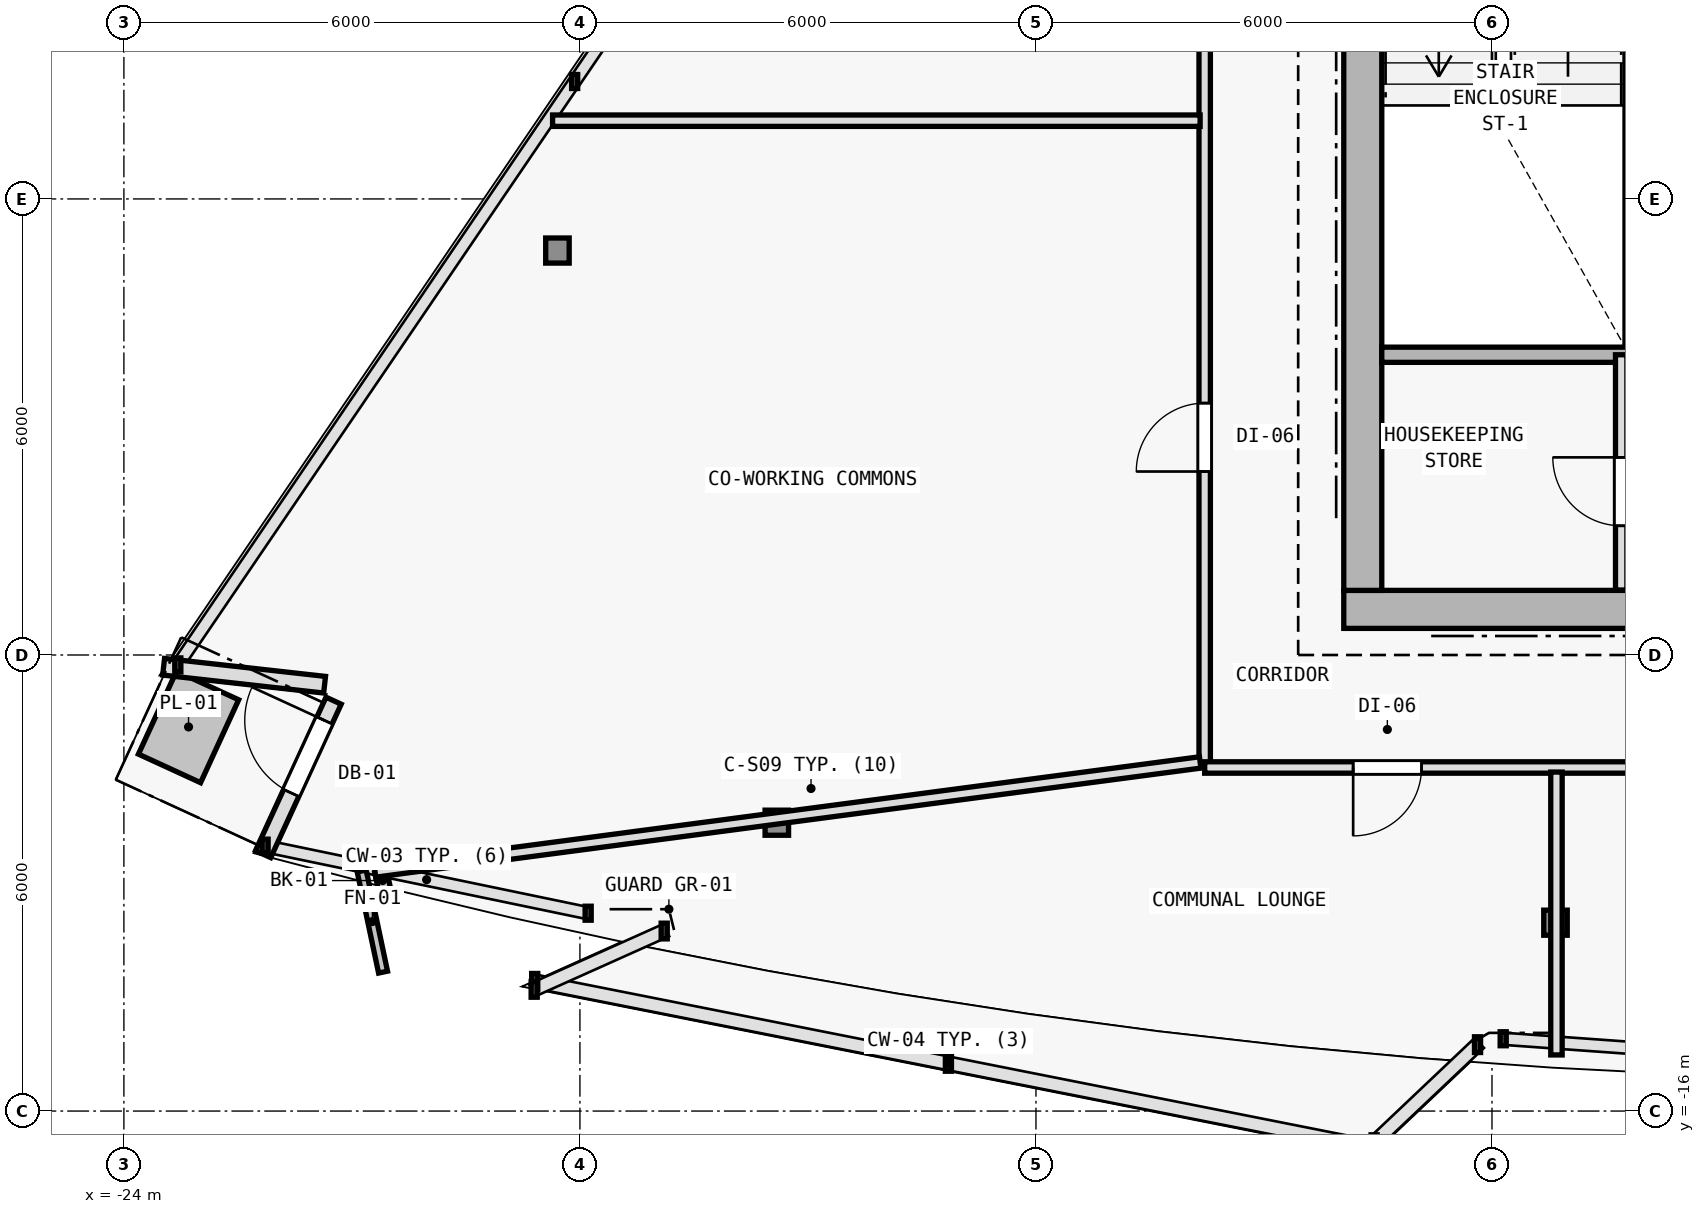
"""IFC4 building model, lengths in metres.
Left out: names, types, materials, properties, quantities, classifications, styles, units other than length and angle.
Written with IfcOpenShell. Run it as: python <this file> out.ifc"""

import sys

from ifc_helpers import new_model, si_unit, direction, frame, frame_2d, origin, origin_2d, place, context, subcontext, project, spatial, rectangle, i_section, extrude, element, fill, save


model = new_model("IFC4")
c1 = context("Model", 3, precision=1e-05, world=origin(), true_north=direction((0.0, 1.0)))
c2 = subcontext(c1, "Body", "Model", "MODEL_VIEW")
j1 = project(units=[si_unit("LENGTHUNIT", "METRE"), si_unit("PLANEANGLEUNIT", "RADIAN")], contexts=[c1])
p1 = place(None, origin())
s1 = spatial("IfcSite", under=j1, at=p1, CompositionType="ELEMENT")
p2 = place(p1, origin())
s2 = spatial("IfcBuilding", under=s1, at=p2, CompositionType="ELEMENT")
p3 = place(p2, frame((0.0, 0.0, 276.0)))
s3 = spatial("IfcBuildingStorey", under=s2, at=p3, CompositionType="ELEMENT", Elevation=276.0)
p4 = place(p3, frame((-7.7, -9.4, 0.0), z_axis=(0.0, 0.0, 1.0), x_axis=(1.0, 0.0, 0.0)))
e1 = element("IfcColumn", 1, at=p4, inside=s3, PredefinedType="COLUMN", context=c2, shape_type="SweptSolid", body=[
    extrude(i_section(OverallWidth=0.374, OverallDepth=0.372, WebThickness=0.012, FlangeThickness=0.02, FilletRadius=0.015, at=origin_2d()), origin(), (0.0, 0.0, 1.0), 3.6),
])
p5 = place(p3, frame((-15.409, -12.207, 0.006), z_axis=(0.021207106828, 0.034461548595, 0.999180994759), x_axis=(-0.851658316705, 0.524097425664, 0.0)))
e2 = element("IfcColumn", 2, at=p5, inside=s3, PredefinedType="COLUMN", context=c2, shape_type="SweptSolid", body=[
    extrude(i_section(OverallWidth=0.309, OverallDepth=0.33, WebThickness=0.011, FlangeThickness=0.019, FilletRadius=0.027, at=origin_2d()), origin(), (0.0, 0.0, 1.0), 3.592),
])
p6 = place(p3, frame((-5.165, -13.522, 0.006), z_axis=(0.007137984635, 0.036233769623, 0.999317848892), x_axis=(-0.981142984211, 0.193283327096, 0.0)))
e3 = element("IfcColumn", 3, at=p6, inside=s3, PredefinedType="COLUMN", context=c2, shape_type="SweptSolid", body=[
    extrude(i_section(OverallWidth=0.309, OverallDepth=0.33, WebThickness=0.011, FlangeThickness=0.019, FilletRadius=0.027, at=origin_2d()), origin(), (0.0, 0.0, 1.0), 3.591),
])
p7 = place(p3, frame((-18.296, -4.679, 0.006), z_axis=(0.025903262414, 0.022231933883, 0.999417211235), x_axis=(-0.65128330188, 0.758834672832, 0.0)))
e4 = element("IfcColumn", 4, at=p7, inside=s3, PredefinedType="COLUMN", context=c2, shape_type="SweptSolid", body=[
    extrude(i_section(OverallWidth=0.309, OverallDepth=0.33, WebThickness=0.011, FlangeThickness=0.019, FilletRadius=0.027, at=origin_2d()), origin(), (0.0, 0.0, 1.0), 3.591),
])
p8 = place(p3, frame((-21.36, -10.391, 0.0), z_axis=(0.0, 0.0, 1.0), x_axis=(-0.993817888275, 0.111022542511, 0.0)))
e5 = element("IfcWall", 5, at=p8, inside=s3, PredefinedType="SOLIDWALL", context=c2, shape_type="SweptSolid", body=[
    extrude(rectangle(XDim=2.131, YDim=0.22, at=frame_2d((1.065, 0.0))), origin(), (0.0, 0.0, 1.0), 3.35),
])
p9 = place(p3, frame((-22.168, -12.62, 0.0), z_axis=(0.0, 0.0, 1.0), x_axis=(0.417426589535, 0.908710648308, 0.0)))
e6 = element("IfcWall", 6, at=p9, inside=s3, PredefinedType="SOLIDWALL", context=c2, shape_type="SweptSolid", body=[
    extrude(rectangle(XDim=2.221, YDim=0.22, at=frame_2d((1.111, 0.0))), origin(), (0.0, 0.0, 1.0), 3.35),
])
p10 = place(p9, frame((0.886, 0.0, 0.0)))
e7 = element("IfcOpeningElement", 7, at=p10, cuts=e6, PredefinedType="OPENING", context=c2, shape_type="SweptSolid", body=[
    extrude(rectangle(XDim=1.05, YDim=2.15, at=frame_2d((0.525, 1.075))), frame((0.0, 0.12, 0.0), z_axis=(0.0, -1.0, 0.0), x_axis=(1.0, 0.0, 0.0)), (0.0, 0.0, 1.0), 0.24),
])
p11 = place(p3, frame((-7.95, -9.4, 0.0), z_axis=(0.0, 0.0, 1.0), x_axis=(1.0, 0.0, 0.0)))
e8 = element("IfcWall", 8, at=p11, inside=s3, PredefinedType="SHEAR", context=c2, shape_type="SweptSolid", body=[
    extrude(rectangle(XDim=15.9, YDim=0.5, at=frame_2d((7.95, 0.0))), origin(), (0.0, 0.0, 1.0), 3.35),
])
p12 = place(p11, frame((9.6, 0.0, 0.0)))
e9 = element("IfcOpeningElement", 9, at=p12, cuts=e8, PredefinedType="OPENING", context=c2, shape_type="SweptSolid", body=[
    extrude(rectangle(XDim=1.5, YDim=2.2, at=frame_2d((0.75, 1.1))), frame((0.0, 0.26, 0.0), z_axis=(0.0, -1.0, 0.0), x_axis=(1.0, 0.0, 0.0)), (0.0, 0.0, 1.0), 0.52),
])
p13 = place(p3, frame((-7.7, -9.15, 0.0), z_axis=(0.0, 0.0, 1.0), x_axis=(0.0, 1.0, 0.0)))
e10 = element("IfcWall", 10, at=p13, inside=s3, PredefinedType="SHEAR", context=c2, shape_type="SweptSolid", body=[
    extrude(rectangle(XDim=19.1, YDim=0.5, at=frame_2d((9.55, 0.0))), origin(), (0.0, 0.0, 1.0), 3.35),
])
p14 = place(p13, frame((12.7, 0.0, 0.0)))
e11 = element("IfcOpeningElement", 11, at=p14, cuts=e10, PredefinedType="OPENING", context=c2, shape_type="SweptSolid", body=[
    extrude(rectangle(XDim=1.1, YDim=2.15, at=frame_2d((0.55, 1.075))), frame((0.0, 0.26, 0.0), z_axis=(0.0, -1.0, 0.0), x_axis=(1.0, 0.0, 0.0)), (0.0, 0.0, 1.0), 0.52),
])
p15 = place(p3, frame((-4.15, -5.95, 0.0), z_axis=(0.0, 0.0, 1.0), x_axis=(0.0, 1.0, 0.0)))
e12 = element("IfcWall", 12, at=p15, inside=s3, PredefinedType="SOLIDWALL", context=c2, shape_type="SweptSolid", body=[
    extrude(rectangle(XDim=7.2, YDim=0.2, at=frame_2d((3.6, 0.0))), origin(), (0.0, 0.0, 1.0), 3.35),
])
p16 = place(p3, frame((-7.45, -6.05, 0.0), z_axis=(0.0, 0.0, 1.0), x_axis=(1.0, 0.0, 0.0)))
e13 = element("IfcWall", 13, at=p16, inside=s3, PredefinedType="SOLIDWALL", context=c2, shape_type="SweptSolid", body=[
    extrude(rectangle(XDim=3.4, YDim=0.2, at=frame_2d((1.7, 0.0))), origin(), (0.0, 0.0, 1.0), 3.35),
])
p17 = place(p3, frame((-4.3, -9.145, 0.0), z_axis=(0.0, 0.0, 1.0), x_axis=(0.0, 1.0, 0.0)))
e14 = element("IfcWall", 14, at=p17, inside=s3, PredefinedType="PARTITIONING", context=c2, shape_type="SweptSolid", body=[
    extrude(rectangle(XDim=3.095, YDim=0.15, at=frame_2d((1.547, 0.0))), origin(), (0.0, 0.0, 1.0), 3.35),
])
p18 = place(p17, frame((0.845, 0.0, 0.0)))
e15 = element("IfcOpeningElement", 15, at=p18, cuts=e14, PredefinedType="OPENING", context=c2, shape_type="SweptSolid", body=[
    extrude(rectangle(XDim=0.9, YDim=2.1, at=frame_2d((0.45, 1.05))), frame((0.0, 0.085, 0.0), z_axis=(0.0, -1.0, 0.0), x_axis=(1.0, 0.0, 0.0)), (0.0, 0.0, 1.0), 0.17),
])
p19 = place(p3, frame((-9.78, -11.48, 0.0), z_axis=(0.0, 0.0, 1.0), x_axis=(0.0, 1.0, 0.0)))
e16 = element("IfcWall", 16, at=p19, inside=s3, PredefinedType="PARTITIONING", context=c2, shape_type="SweptSolid", body=[
    extrude(rectangle(XDim=19.706, YDim=0.15, at=frame_2d((9.853, 0.0))), origin(), (0.0, 0.0, 1.0), 2.775),
])
p20 = place(p19, frame((11.781, 0.0, 0.0)))
e17 = element("IfcOpeningElement", 17, at=p20, cuts=e16, PredefinedType="OPENING", context=c2, shape_type="SweptSolid", body=[
    extrude(rectangle(XDim=0.9, YDim=2.1, at=frame_2d((0.45, 1.05))), frame((0.0, 0.085, 0.0), z_axis=(0.0, -1.0, 0.0), x_axis=(1.0, 0.0, 0.0)), (0.0, 0.0, 1.0), 0.17),
])
p21 = place(p19, frame((3.894, 0.0, 0.0)))
e18 = element("IfcOpeningElement", 18, at=p21, cuts=e16, PredefinedType="OPENING", context=c2, shape_type="SweptSolid", body=[
    extrude(rectangle(XDim=0.9, YDim=2.1, at=frame_2d((0.45, 1.05))), frame((0.0, 0.085, 0.0), z_axis=(0.0, -1.0, 0.0), x_axis=(1.0, 0.0, 0.0)), (0.0, 0.0, 1.0), 0.17),
])
p22 = place(p3, frame((9.78, -11.48, 0.0), z_axis=(0.0, 0.0, 1.0), x_axis=(-1.0, 0.0, 0.0)))
e19 = element("IfcWall", 19, at=p22, inside=s3, PredefinedType="PARTITIONING", context=c2, shape_type="SweptSolid", body=[
    extrude(rectangle(XDim=19.56, YDim=0.15, at=frame_2d((9.78, 0.0))), origin(), (0.0, 0.0, 1.0), 2.825),
])
p23 = place(p22, frame((16.707, 0.0, 0.0)))
e20 = element("IfcOpeningElement", 20, at=p23, cuts=e19, PredefinedType="OPENING", context=c2, shape_type="SweptSolid", body=[
    extrude(rectangle(XDim=0.9, YDim=2.1, at=frame_2d((0.45, 1.05))), frame((0.0, 0.085, 0.0), z_axis=(0.0, -1.0, 0.0), x_axis=(1.0, 0.0, 0.0)), (0.0, 0.0, 1.0), 0.17),
])
p24 = place(p22, frame((8.575, 0.0, 0.0)))
e21 = element("IfcOpeningElement", 21, at=p24, cuts=e19, PredefinedType="OPENING", context=c2, shape_type="SweptSolid", body=[
    extrude(rectangle(XDim=0.9, YDim=2.1, at=frame_2d((0.45, 1.05))), frame((0.0, 0.085, 0.0), z_axis=(0.0, -1.0, 0.0), x_axis=(1.0, 0.0, 0.0)), (0.0, 0.0, 1.0), 0.17),
])
p25 = place(p22, frame((1.198, 0.0, 0.0)))
e22 = element("IfcOpeningElement", 22, at=p25, cuts=e19, PredefinedType="OPENING", context=c2, shape_type="SweptSolid", body=[
    extrude(rectangle(XDim=0.9, YDim=2.1, at=frame_2d((0.45, 1.05))), frame((0.0, 0.085, 0.0), z_axis=(0.0, -1.0, 0.0), x_axis=(1.0, 0.0, 0.0)), (0.0, 0.0, 1.0), 0.17),
])
p26 = place(p3, frame((-9.839, -11.414, 0.0), z_axis=(0.0, 0.0, 1.0), x_axis=(-0.991382590764, -0.130998315755, 0.0)))
e23 = element("IfcWall", 23, at=p26, inside=s3, PredefinedType="PARTITIONING", context=c2, shape_type="SweptSolid", body=[
    extrude(rectangle(XDim=10.951, YDim=0.15, at=frame_2d((5.476, 0.0))), origin(), (0.0, 0.0, 1.0), 2.825),
])
p27 = place(p3, frame((-5.152, -11.54, 0.0), z_axis=(0.0, 0.0, 1.0), x_axis=(0.0, -1.0, 0.0)))
e24 = element("IfcWall", 24, at=p27, inside=s3, PredefinedType="PARTITIONING", context=c2, shape_type="SweptSolid", body=[
    extrude(rectangle(XDim=3.722, YDim=0.15, at=frame_2d((1.861, 0.0))), origin(), (0.0, 0.0, 1.0), 2.825),
])
p28 = place(p3, frame((-9.84, -2.971, 0.0), z_axis=(0.0, 0.0, 1.0), x_axis=(-1.0, 0.0, 0.0)))
e25 = element("IfcWall", 25, at=p28, inside=s3, PredefinedType="PARTITIONING", context=c2, shape_type="SweptSolid", body=[
    extrude(rectangle(XDim=8.52, YDim=0.15, at=frame_2d((4.26, 0.0))), origin(), (0.0, 0.0, 1.0), 2.825),
])
p29 = place(p10, origin())
e26 = element("IfcDoor", 26, at=p29, inside=s3, OperationType="SINGLE_SWING_RIGHT", PredefinedType="DOOR", context=c2, shape_type="SweptSolid", body=[
    extrude(rectangle(XDim=1.05, YDim=2.15, at=frame_2d((0.525, 1.075))), frame((0.0, 0.025, 0.0), z_axis=(0.0, -1.0, 0.0), x_axis=(1.0, 0.0, 0.0)), (0.0, 0.0, 1.0), 0.05),
])
fill(e7, e26)
p30 = place(p18, origin())
e27 = element("IfcDoor", 27, at=p30, inside=s3, OperationType="SINGLE_SWING_RIGHT", PredefinedType="DOOR", context=c2, shape_type="SweptSolid", body=[
    extrude(rectangle(XDim=0.9, YDim=2.1, at=frame_2d((0.45, 1.05))), frame((0.0, 0.025, 0.0), z_axis=(0.0, -1.0, 0.0), x_axis=(1.0, 0.0, 0.0)), (0.0, 0.0, 1.0), 0.05),
])
fill(e15, e27)
p31 = place(p21, origin())
e28 = element("IfcDoor", 28, at=p31, inside=s3, OperationType="SINGLE_SWING_LEFT", PredefinedType="DOOR", context=c2, shape_type="SweptSolid", body=[
    extrude(rectangle(XDim=0.9, YDim=2.1, at=frame_2d((0.45, 1.05))), frame((0.0, 0.025, 0.0), z_axis=(0.0, -1.0, 0.0), x_axis=(1.0, 0.0, 0.0)), (0.0, 0.0, 1.0), 0.05),
])
fill(e18, e28)
p32 = place(p23, origin())
e29 = element("IfcDoor", 29, at=p32, inside=s3, OperationType="SINGLE_SWING_RIGHT", PredefinedType="DOOR", context=c2, shape_type="SweptSolid", body=[
    extrude(rectangle(XDim=0.9, YDim=2.1, at=frame_2d((0.45, 1.05))), frame((0.0, 0.025, 0.0), z_axis=(0.0, -1.0, 0.0), x_axis=(1.0, 0.0, 0.0)), (0.0, 0.0, 1.0), 0.05),
])
fill(e20, e29)
save(model, sys.argv[1])
